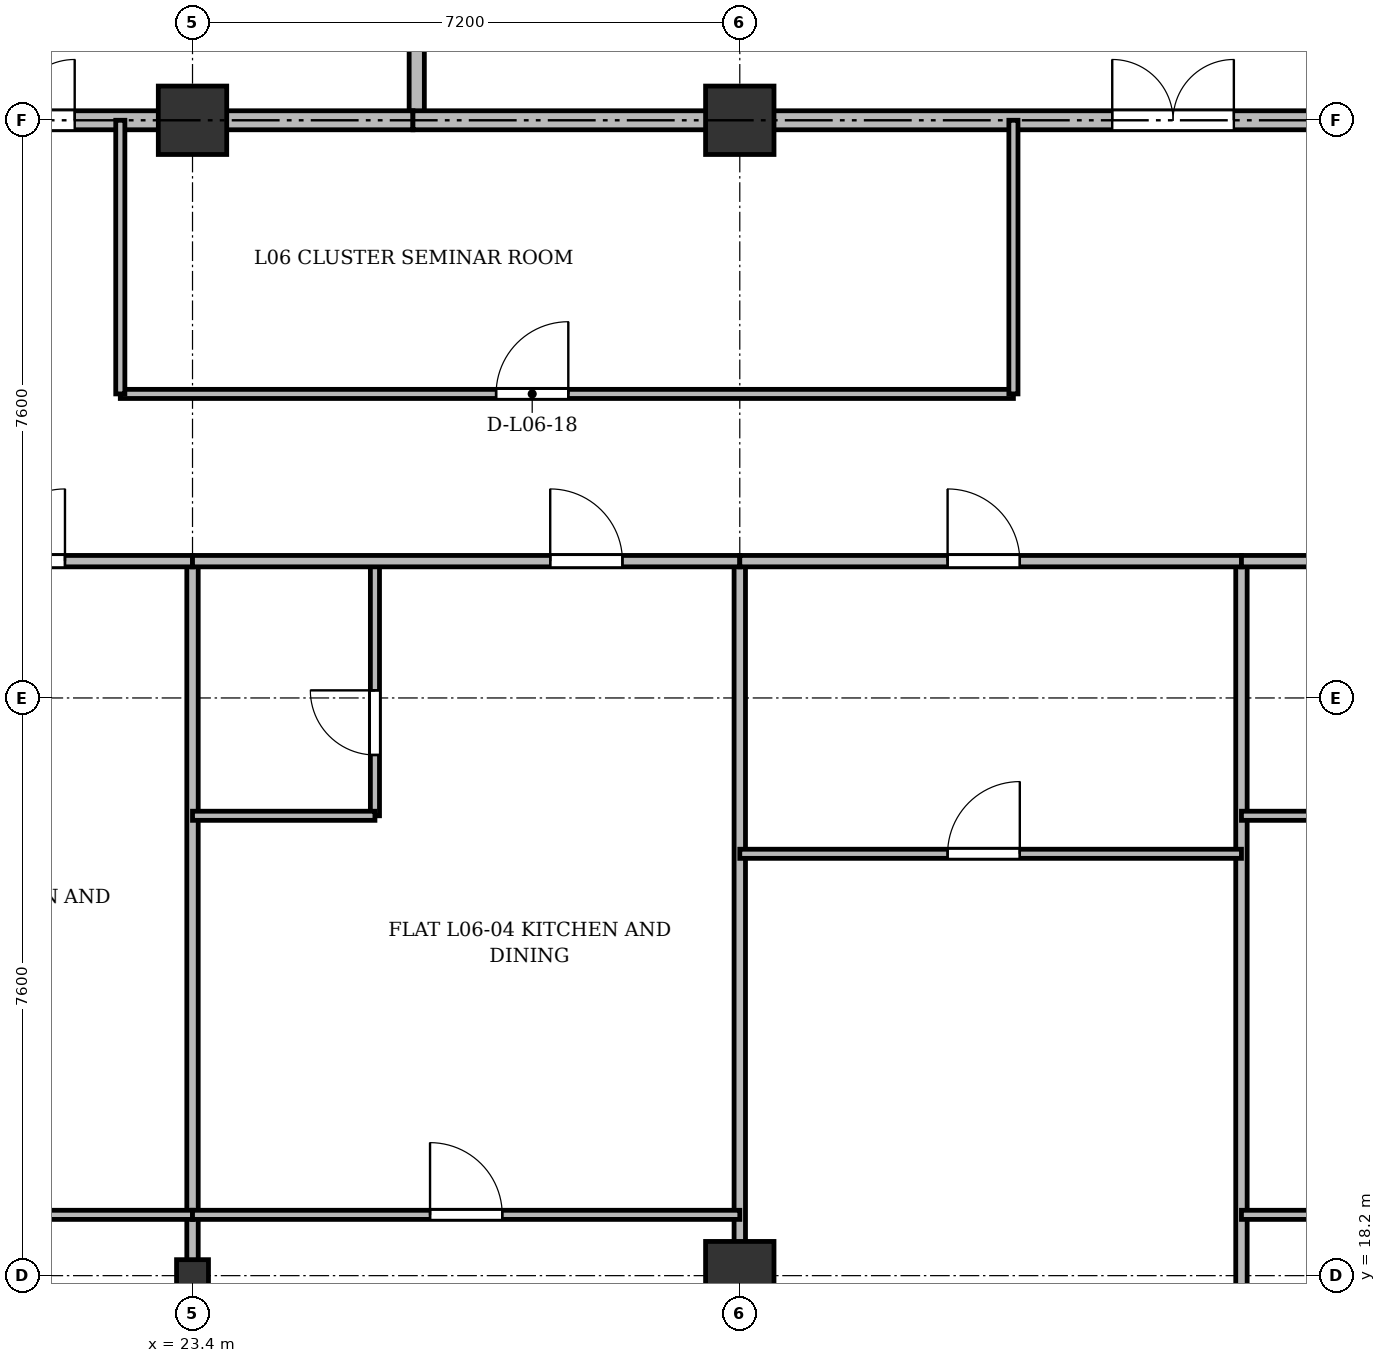
"""IFC4 building model, lengths in metres.
Left out: names, types, materials, properties, quantities, classifications, styles, units other than length and angle.
Written with IfcOpenShell. Run it as: python <this file> out.ifc"""

import sys

from ifc_helpers import new_model, si_unit, direction, frame, frame_2d, origin, origin_2d, place, context, subcontext, project, spatial, rectangle, i_section, extrude, source, transform, mapped, element, fill, save


model = new_model("IFC4")
c1 = context("Model", 3, precision=1e-05, world=origin(), true_north=direction((0.0, 1.0)))
c2 = subcontext(c1, "Body", "Model", "MODEL_VIEW")
j1 = project(units=[si_unit("LENGTHUNIT", "METRE"), si_unit("PLANEANGLEUNIT", "RADIAN")], contexts=[c1])
p1 = place(None, origin())
s1 = spatial("IfcSite", under=j1, at=p1, CompositionType="ELEMENT")
p2 = place(p1, origin())
s2 = spatial("IfcBuilding", under=s1, at=p2, CompositionType="ELEMENT")
p3 = place(p2, frame((0.0, 0.0, 27.1)))
s3 = spatial("IfcBuildingStorey", under=s2, at=p3, CompositionType="ELEMENT", Elevation=27.1)
m1 = source(origin(), c2, "Body", "SweptSolid", [
    extrude(i_section(OverallWidth=0.42, OverallDepth=0.42, WebThickness=0.026, FlangeThickness=0.04, at=origin_2d()), origin(), (0.0, 0.0, 1.0), 3.6),
])
p4 = place(p3, frame((23.4, 18.2, 0.0), z_axis=(0.0, 0.0, 1.0), x_axis=(1.0, 0.0, 0.0)))
e1 = element("IfcColumn", 1, at=p4, inside=s3, PredefinedType="COLUMN", context=c2, shape_type="MappedRepresentation", body=[
    mapped(m1, transform((0.0, 0.0, 0.0), x_axis=(1.0, 0.0, 0.0), y_axis=(0.0, 1.0, 0.0), z_axis=(0.0, 0.0, 1.0), scale=1.0)),
])
m2 = source(origin(), c2, "Body", "SweptSolid", [
    extrude(rectangle(XDim=0.9, YDim=0.9, at=origin_2d()), origin(), (0.0, 0.0, 1.0), 3.6),
])
for number, where, z_axis, x_axis in (
    (2, (23.4, 33.4, 0.0), (0.0, 0.0, 1.0), (1.0, 0.0, 0.0)),
    (3, (30.6, 18.2, 0.0), (0.0, 0.0, 1.0), (1.0, 0.0, 0.0)),
    (4, (30.6, 33.4, 0.0), (0.0, 0.0, 1.0), (1.0, 0.0, 0.0)),
):
    element("IfcColumn", number, at=place(p3, frame(where, z_axis=z_axis, x_axis=x_axis)), inside=s3, PredefinedType="COLUMN", context=c2, shape_type="MappedRepresentation", body=[
        mapped(m2, transform((0.0, 0.0, 0.0), x_axis=(1.0, 0.0, 0.0), y_axis=(0.0, 1.0, 0.0), z_axis=(0.0, 0.0, 1.0), scale=1.0)),
    ])
p5 = place(p3, frame((26.35, 33.4, 0.0), z_axis=(0.0, 0.0, 1.0), x_axis=(0.0, 1.0, 0.0)))
e5 = element("IfcWall", 5, at=p5, inside=s3, PredefinedType="SOLIDWALL", context=c2, shape_type="SweptSolid", body=[
    extrude(rectangle(XDim=11.3, YDim=0.2, at=frame_2d((5.65, 0.0))), origin(), (0.0, 0.0, 1.0), 2.69),
])
p6 = place(p3, frame((19.5, 33.4, 0.0), z_axis=(0.0, 0.0, 1.0), x_axis=(1.0, 0.0, 0.0)))
e6 = element("IfcWall", 6, at=p6, inside=s3, PredefinedType="PARTITIONING", context=c2, shape_type="SweptSolid", body=[
    extrude(rectangle(XDim=6.8, YDim=0.25, at=frame_2d((3.4, 0.0))), origin(), (0.0, 0.0, 1.0), 2.69),
])
p7 = place(p6, frame((0.75, 0.0, 0.0)))
e7 = element("IfcOpeningElement", 7, at=p7, cuts=e6, PredefinedType="OPENING", context=c2, shape_type="SweptSolid", body=[
    extrude(rectangle(XDim=1.6, YDim=2.2, at=frame_2d((0.8, 1.1))), frame((0.0, 0.135, 0.0), z_axis=(0.0, -1.0, 0.0), x_axis=(1.0, 0.0, 0.0)), (0.0, 0.0, 1.0), 0.27),
])
p8 = place(p3, frame((26.3, 33.4, 0.0), z_axis=(0.0, 0.0, 1.0), x_axis=(1.0, 0.0, 0.0)))
e8 = element("IfcWall", 8, at=p8, inside=s3, PredefinedType="PARTITIONING", context=c2, shape_type="SweptSolid", body=[
    extrude(rectangle(XDim=20.85, YDim=0.25, at=frame_2d((10.425, 0.0))), origin(), (0.0, 0.0, 1.0), 2.69),
])
p9 = place(p8, frame((9.2, 0.0, 0.0)))
e9 = element("IfcOpeningElement", 9, at=p9, cuts=e8, PredefinedType="OPENING", context=c2, shape_type="SweptSolid", body=[
    extrude(rectangle(XDim=1.6, YDim=2.2, at=frame_2d((0.8, 1.1))), frame((0.0, 0.135, 0.0), z_axis=(0.0, -1.0, 0.0), x_axis=(1.0, 0.0, 0.0)), (0.0, 0.0, 1.0), 0.27),
])
p10 = place(p3, frame((22.45, 29.8, 0.0), z_axis=(0.0, 0.0, 1.0), x_axis=(1.0, 0.0, 0.0)))
e10 = element("IfcWall", 10, at=p10, inside=s3, PredefinedType="PARTITIONING", context=c2, shape_type="SweptSolid", body=[
    extrude(rectangle(XDim=11.75, YDim=0.12, at=frame_2d((5.875, 0.0))), origin(), (0.0, 0.0, 1.0), 2.752),
])
p11 = place(p10, frame((4.944, 0.0, 0.0)))
e11 = element("IfcOpeningElement", 11, at=p11, cuts=e10, PredefinedType="OPENING", context=c2, shape_type="SweptSolid", body=[
    extrude(rectangle(XDim=0.95, YDim=2.15, at=frame_2d((0.475, 1.075))), frame((0.0, 0.07, 0.0), z_axis=(0.0, -1.0, 0.0), x_axis=(1.0, 0.0, 0.0)), (0.0, 0.0, 1.0), 0.14),
])
for number, where, z_axis, x_axis in (
    (12, (22.45, 29.8, 0.0), (0.0, 0.0, 1.0), (0.0, 1.0, 0.0)),
    (13, (34.2, 29.8, 0.0), (0.0, 0.0, 1.0), (0.0, 1.0, 0.0)),
):
    element("IfcWall", number, at=place(p3, frame(where, z_axis=z_axis, x_axis=x_axis)), inside=s3, PredefinedType="PARTITIONING", context=c2, shape_type="SweptSolid", body=[
        extrude(rectangle(XDim=3.6, YDim=0.12, at=frame_2d((1.8, 0.0))), origin(), (0.0, 0.0, 1.0), 2.69),
    ])
for number, where, z_axis, x_axis in (
    (14, (23.4, 3.145, 0.0), (0.0, 0.0, 1.0), (0.0, 1.0, 0.0)),
    (15, (30.6, 3.145, 0.0), (0.0, 0.0, 1.0), (0.0, 1.0, 0.0)),
):
    element("IfcWall", number, at=place(p3, frame(where, z_axis=z_axis, x_axis=x_axis)), inside=s3, PredefinedType="PARTITIONING", context=c2, shape_type="SweptSolid", body=[
        extrude(rectangle(XDim=24.455, YDim=0.15, at=frame_2d((12.228, 0.0))), origin(), (0.0, 0.0, 1.0), 2.752),
    ])
p12 = place(p3, frame((37.2, 3.145, 0.0), z_axis=(0.0, 0.0, 1.0), x_axis=(0.0, 1.0, 0.0)))
e16 = element("IfcWall", 16, at=p12, inside=s3, PredefinedType="PARTITIONING", context=c2, shape_type="SweptSolid", body=[
    extrude(rectangle(XDim=24.455, YDim=0.15, at=frame_2d((12.228, 0.0))), origin(), (0.0, 0.0, 1.0), 2.69),
])
p13 = place(p3, frame((15.6, 19.0, 0.0), z_axis=(0.0, 0.0, 1.0), x_axis=(1.0, 0.0, 0.0)))
e17 = element("IfcWall", 17, at=p13, inside=s3, PredefinedType="PARTITIONING", context=c2, shape_type="SweptSolid", body=[
    extrude(rectangle(XDim=7.8, YDim=0.12, at=frame_2d((3.9, 0.0))), origin(), (0.0, 0.0, 1.0), 2.752),
])
p14 = place(p13, frame((3.333, 0.0, 0.0)))
e18 = element("IfcOpeningElement", 18, at=p14, cuts=e17, PredefinedType="OPENING", context=c2, shape_type="SweptSolid", body=[
    extrude(rectangle(XDim=0.95, YDim=2.15, at=frame_2d((0.475, 1.075))), frame((0.0, 0.07, 0.0), z_axis=(0.0, -1.0, 0.0), x_axis=(1.0, 0.0, 0.0)), (0.0, 0.0, 1.0), 0.14),
])
p15 = place(p3, frame((15.6, 27.6, 0.0), z_axis=(0.0, 0.0, 1.0), x_axis=(1.0, 0.0, 0.0)))
e19 = element("IfcWall", 19, at=p15, inside=s3, PredefinedType="PARTITIONING", context=c2, shape_type="SweptSolid", body=[
    extrude(rectangle(XDim=7.8, YDim=0.15, at=frame_2d((3.9, 0.0))), origin(), (0.0, 0.0, 1.0), 2.752),
])
p16 = place(p15, frame((5.172, 0.0, 0.0)))
e20 = element("IfcOpeningElement", 20, at=p16, cuts=e19, PredefinedType="OPENING", context=c2, shape_type="SweptSolid", body=[
    extrude(rectangle(XDim=0.95, YDim=2.15, at=frame_2d((0.475, 1.075))), frame((0.0, 0.085, 0.0), z_axis=(0.0, -1.0, 0.0), x_axis=(1.0, 0.0, 0.0)), (0.0, 0.0, 1.0), 0.17),
])
p17 = place(p3, frame((23.4, 19.0, 0.0), z_axis=(0.0, 0.0, 1.0), x_axis=(1.0, 0.0, 0.0)))
e21 = element("IfcWall", 21, at=p17, inside=s3, PredefinedType="PARTITIONING", context=c2, shape_type="SweptSolid", body=[
    extrude(rectangle(XDim=7.2, YDim=0.12, at=frame_2d((3.6, 0.0))), origin(), (0.0, 0.0, 1.0), 2.752),
])
p18 = place(p17, frame((3.125, 0.0, 0.0)))
e22 = element("IfcOpeningElement", 22, at=p18, cuts=e21, PredefinedType="OPENING", context=c2, shape_type="SweptSolid", body=[
    extrude(rectangle(XDim=0.95, YDim=2.15, at=frame_2d((0.475, 1.075))), frame((0.0, 0.07, 0.0), z_axis=(0.0, -1.0, 0.0), x_axis=(1.0, 0.0, 0.0)), (0.0, 0.0, 1.0), 0.14),
])
p19 = place(p3, frame((25.8, 24.25, 0.0), z_axis=(0.0, 0.0, 1.0), x_axis=(0.0, 1.0, 0.0)))
e23 = element("IfcWall", 23, at=p19, inside=s3, PredefinedType="PARTITIONING", context=c2, shape_type="SweptSolid", body=[
    extrude(rectangle(XDim=3.35, YDim=0.12, at=frame_2d((1.675, 0.0))), origin(), (0.0, 0.0, 1.0), 2.94),
])
p20 = place(p19, frame((0.8, 0.0, 0.0)))
e24 = element("IfcOpeningElement", 24, at=p20, cuts=e23, PredefinedType="OPENING", context=c2, shape_type="SweptSolid", body=[
    extrude(rectangle(XDim=0.85, YDim=2.1, at=frame_2d((0.425, 1.05))), frame((0.0, 0.07, 0.0), z_axis=(0.0, -1.0, 0.0), x_axis=(1.0, 0.0, 0.0)), (0.0, 0.0, 1.0), 0.14),
])
p21 = place(p3, frame((23.4, 24.25, 0.0), z_axis=(0.0, 0.0, 1.0), x_axis=(1.0, 0.0, 0.0)))
e25 = element("IfcWall", 25, at=p21, inside=s3, PredefinedType="PARTITIONING", context=c2, shape_type="SweptSolid", body=[
    extrude(rectangle(XDim=2.4, YDim=0.12, at=frame_2d((1.2, 0.0))), origin(), (0.0, 0.0, 1.0), 2.752),
])
p22 = place(p3, frame((23.4, 27.6, 0.0), z_axis=(0.0, 0.0, 1.0), x_axis=(1.0, 0.0, 0.0)))
e26 = element("IfcWall", 26, at=p22, inside=s3, PredefinedType="PARTITIONING", context=c2, shape_type="SweptSolid", body=[
    extrude(rectangle(XDim=7.2, YDim=0.15, at=frame_2d((3.6, 0.0))), origin(), (0.0, 0.0, 1.0), 2.752),
])
p23 = place(p22, frame((4.706, 0.0, 0.0)))
e27 = element("IfcOpeningElement", 27, at=p23, cuts=e26, PredefinedType="OPENING", context=c2, shape_type="SweptSolid", body=[
    extrude(rectangle(XDim=0.95, YDim=2.15, at=frame_2d((0.475, 1.075))), frame((0.0, 0.085, 0.0), z_axis=(0.0, -1.0, 0.0), x_axis=(1.0, 0.0, 0.0)), (0.0, 0.0, 1.0), 0.17),
])
p24 = place(p3, frame((30.6, 27.6, 0.0), z_axis=(0.0, 0.0, 1.0), x_axis=(1.0, 0.0, 0.0)))
e28 = element("IfcWall", 28, at=p24, inside=s3, PredefinedType="PARTITIONING", context=c2, shape_type="SweptSolid", body=[
    extrude(rectangle(XDim=6.6, YDim=0.15, at=frame_2d((3.3, 0.0))), origin(), (0.0, 0.0, 1.0), 2.752),
])
p25 = place(p24, frame((2.734, 0.0, 0.0)))
e29 = element("IfcOpeningElement", 29, at=p25, cuts=e28, PredefinedType="OPENING", context=c2, shape_type="SweptSolid", body=[
    extrude(rectangle(XDim=0.95, YDim=2.15, at=frame_2d((0.475, 1.075))), frame((0.0, 0.085, 0.0), z_axis=(0.0, -1.0, 0.0), x_axis=(1.0, 0.0, 0.0)), (0.0, 0.0, 1.0), 0.17),
])
p26 = place(p3, frame((30.6, 23.75, 0.0), z_axis=(0.0, 0.0, 1.0), x_axis=(1.0, 0.0, 0.0)))
e30 = element("IfcWall", 30, at=p26, inside=s3, PredefinedType="PARTITIONING", context=c2, shape_type="SweptSolid", body=[
    extrude(rectangle(XDim=6.6, YDim=0.12, at=frame_2d((3.3, 0.0))), origin(), (0.0, 0.0, 1.0), 2.752),
])
p27 = place(p26, frame((2.734, 0.0, 0.0)))
e31 = element("IfcOpeningElement", 31, at=p27, cuts=e30, PredefinedType="OPENING", context=c2, shape_type="SweptSolid", body=[
    extrude(rectangle(XDim=0.95, YDim=2.15, at=frame_2d((0.475, 1.075))), frame((0.0, 0.07, 0.0), z_axis=(0.0, -1.0, 0.0), x_axis=(1.0, 0.0, 0.0)), (0.0, 0.0, 1.0), 0.14),
])
p28 = place(p3, frame((37.2, 19.0, 0.0), z_axis=(0.0, 0.0, 1.0), x_axis=(1.0, 0.0, 0.0)))
e32 = element("IfcWall", 32, at=p28, inside=s3, PredefinedType="PARTITIONING", context=c2, shape_type="SweptSolid", body=[
    extrude(rectangle(XDim=6.6, YDim=0.12, at=frame_2d((3.3, 0.0))), origin(), (0.0, 0.0, 1.0), 2.752),
])
p29 = place(p28, frame((2.734, 0.0, 0.0)))
e33 = element("IfcOpeningElement", 33, at=p29, cuts=e32, PredefinedType="OPENING", context=c2, shape_type="SweptSolid", body=[
    extrude(rectangle(XDim=0.95, YDim=2.15, at=frame_2d((0.475, 1.075))), frame((0.0, 0.07, 0.0), z_axis=(0.0, -1.0, 0.0), x_axis=(1.0, 0.0, 0.0)), (0.0, 0.0, 1.0), 0.14),
])
p30 = place(p3, frame((37.2, 24.25, 0.0), z_axis=(0.0, 0.0, 1.0), x_axis=(1.0, 0.0, 0.0)))
e34 = element("IfcWall", 34, at=p30, inside=s3, PredefinedType="PARTITIONING", context=c2, shape_type="SweptSolid", body=[
    extrude(rectangle(XDim=2.294, YDim=0.12, at=frame_2d((1.147, 0.0))), origin(), (0.0, 0.0, 1.0), 3.34),
])
p31 = place(p3, frame((37.2, 27.6, 0.0), z_axis=(0.0, 0.0, 1.0), x_axis=(1.0, 0.0, 0.0)))
e35 = element("IfcWall", 35, at=p31, inside=s3, PredefinedType="PARTITIONING", context=c2, shape_type="SweptSolid", body=[
    extrude(rectangle(XDim=6.6, YDim=0.15, at=frame_2d((3.3, 0.0))), origin(), (0.0, 0.0, 1.0), 2.752),
])
p32 = place(p31, frame((4.337, 0.0, 0.0)))
e36 = element("IfcOpeningElement", 36, at=p32, cuts=e35, PredefinedType="OPENING", context=c2, shape_type="SweptSolid", body=[
    extrude(rectangle(XDim=0.95, YDim=2.15, at=frame_2d((0.475, 1.075))), frame((0.0, 0.085, 0.0), z_axis=(0.0, -1.0, 0.0), x_axis=(1.0, 0.0, 0.0)), (0.0, 0.0, 1.0), 0.17),
])
m3 = source(origin(), c2, "Body", "SweptSolid", [
    extrude(rectangle(XDim=1.6, YDim=2.2, at=frame_2d((0.8, 1.1))), frame((0.0, 0.025, 0.0), z_axis=(0.0, -1.0, 0.0), x_axis=(1.0, 0.0, 0.0)), (0.0, 0.0, 1.0), 0.05),
])
p33 = place(p7, origin())
e37 = element("IfcDoor", 37, at=p33, inside=s3, OperationType="DOUBLE_DOOR_SINGLE_SWING", PredefinedType="DOOR", context=c2, shape_type="MappedRepresentation", body=[
    mapped(m3, transform((0.0, 0.0, 0.0), x_axis=(1.0, 0.0, 0.0), y_axis=(0.0, 1.0, 0.0), z_axis=(0.0, 0.0, 1.0), scale=1.0)),
])
fill(e7, e37)
p34 = place(p9, origin())
e38 = element("IfcDoor", 38, at=p34, inside=s3, OperationType="DOUBLE_DOOR_SINGLE_SWING", PredefinedType="DOOR", context=c2, shape_type="MappedRepresentation", body=[
    mapped(m3, transform((0.0, 0.0, 0.0), x_axis=(1.0, 0.0, 0.0), y_axis=(0.0, 1.0, 0.0), z_axis=(0.0, 0.0, 1.0), scale=1.0)),
])
fill(e9, e38)
m4 = source(origin(), c2, "Body", "SweptSolid", [
    extrude(rectangle(XDim=0.95, YDim=2.15, at=frame_2d((0.475, 1.075))), frame((0.0, 0.025, 0.0), z_axis=(0.0, -1.0, 0.0), x_axis=(1.0, 0.0, 0.0)), (0.0, 0.0, 1.0), 0.05),
])
p35 = place(p11, origin())
e39 = element("IfcDoor", 39, at=p35, inside=s3, OperationType="SINGLE_SWING_RIGHT", PredefinedType="DOOR", context=c2, shape_type="MappedRepresentation", body=[
    mapped(m4, transform((0.0, 0.0, 0.0), x_axis=(1.0, 0.0, 0.0), y_axis=(0.0, 1.0, 0.0), z_axis=(0.0, 0.0, 1.0), scale=1.0)),
])
fill(e11, e39)
p36 = place(p16, origin())
e40 = element("IfcDoor", 40, at=p36, inside=s3, OperationType="SINGLE_SWING_RIGHT", PredefinedType="DOOR", context=c2, shape_type="MappedRepresentation", body=[
    mapped(m4, transform((0.0, 0.0, 0.0), x_axis=(1.0, 0.0, 0.0), y_axis=(0.0, 1.0, 0.0), z_axis=(0.0, 0.0, 1.0), scale=1.0)),
])
fill(e20, e40)
p37 = place(p18, origin())
e41 = element("IfcDoor", 41, at=p37, inside=s3, OperationType="SINGLE_SWING_LEFT", PredefinedType="DOOR", context=c2, shape_type="MappedRepresentation", body=[
    mapped(m4, transform((0.0, 0.0, 0.0), x_axis=(1.0, 0.0, 0.0), y_axis=(0.0, 1.0, 0.0), z_axis=(0.0, 0.0, 1.0), scale=1.0)),
])
fill(e22, e41)
m5 = source(origin(), c2, "Body", "SweptSolid", [
    extrude(rectangle(XDim=0.85, YDim=2.1, at=frame_2d((0.425, 1.05))), frame((0.0, 0.025, 0.0), z_axis=(0.0, -1.0, 0.0), x_axis=(1.0, 0.0, 0.0)), (0.0, 0.0, 1.0), 0.05),
])
p38 = place(p20, origin())
e42 = element("IfcDoor", 42, at=p38, inside=s3, OperationType="SINGLE_SWING_RIGHT", PredefinedType="DOOR", context=c2, shape_type="MappedRepresentation", body=[
    mapped(m5, transform((0.0, 0.0, 0.0), x_axis=(1.0, 0.0, 0.0), y_axis=(0.0, 1.0, 0.0), z_axis=(0.0, 0.0, 1.0), scale=1.0)),
])
fill(e24, e42)
p39 = place(p23, origin())
e43 = element("IfcDoor", 43, at=p39, inside=s3, OperationType="SINGLE_SWING_LEFT", PredefinedType="DOOR", context=c2, shape_type="MappedRepresentation", body=[
    mapped(m4, transform((0.0, 0.0, 0.0), x_axis=(1.0, 0.0, 0.0), y_axis=(0.0, 1.0, 0.0), z_axis=(0.0, 0.0, 1.0), scale=1.0)),
])
fill(e27, e43)
p40 = place(p25, origin())
e44 = element("IfcDoor", 44, at=p40, inside=s3, OperationType="SINGLE_SWING_LEFT", PredefinedType="DOOR", context=c2, shape_type="MappedRepresentation", body=[
    mapped(m4, transform((0.0, 0.0, 0.0), x_axis=(1.0, 0.0, 0.0), y_axis=(0.0, 1.0, 0.0), z_axis=(0.0, 0.0, 1.0), scale=1.0)),
])
fill(e29, e44)
p41 = place(p27, origin())
e45 = element("IfcDoor", 45, at=p41, inside=s3, OperationType="SINGLE_SWING_RIGHT", PredefinedType="DOOR", context=c2, shape_type="MappedRepresentation", body=[
    mapped(m4, transform((0.0, 0.0, 0.0), x_axis=(1.0, 0.0, 0.0), y_axis=(0.0, 1.0, 0.0), z_axis=(0.0, 0.0, 1.0), scale=1.0)),
])
fill(e31, e45)
save(model, sys.argv[1])
